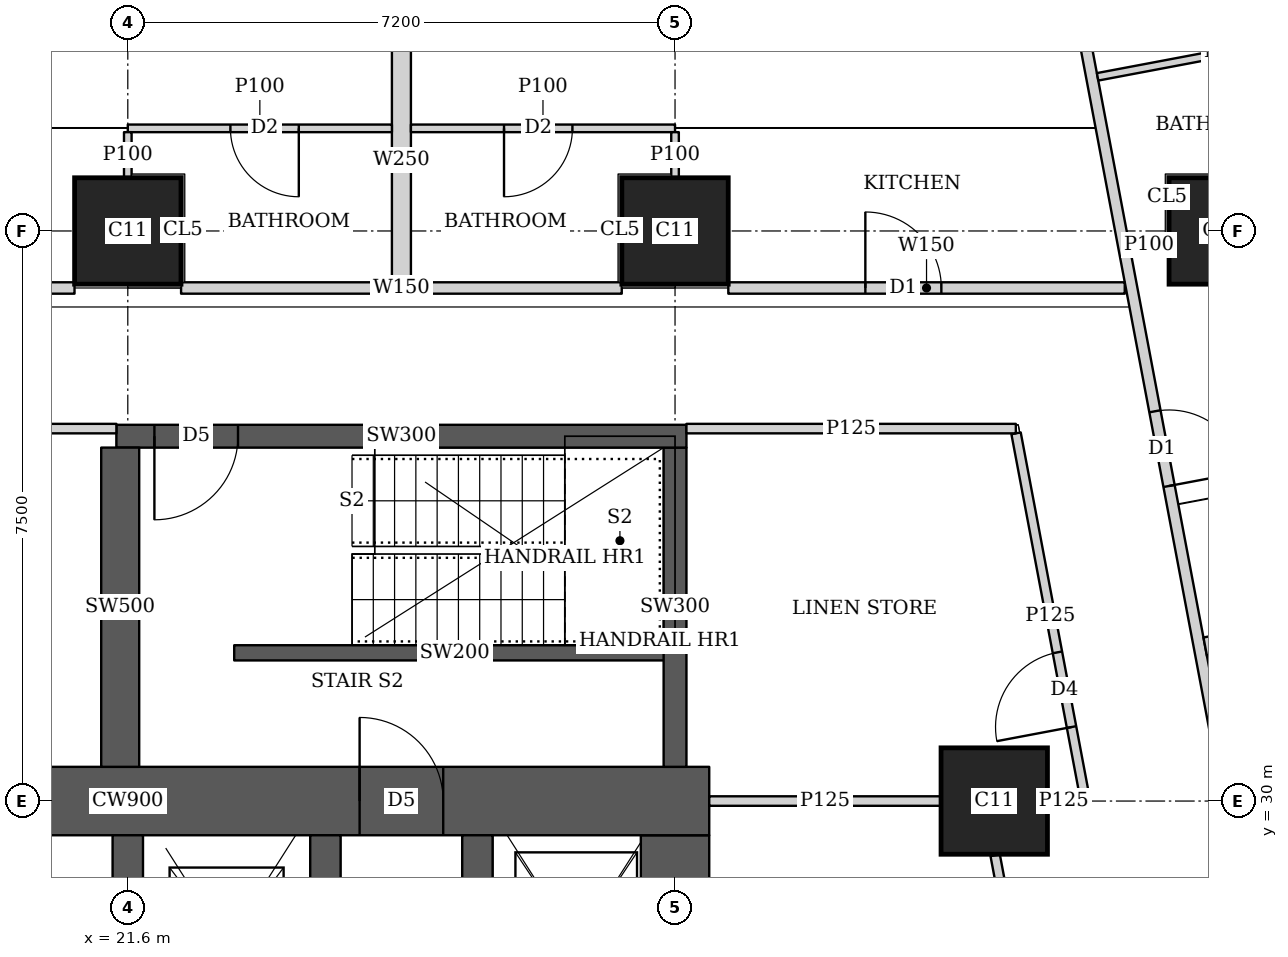
"""IFC4 building model, lengths in metres.
Left out: names, types, materials, properties, quantities, classifications, styles, units other than length and angle.
Written with IfcOpenShell. Run it as: python <this file> out.ifc"""

import sys

from ifc_helpers import new_model, si_unit, direction, frame, frame_2d, origin, origin_2d, place, context, subcontext, project, spatial, rectangle, extrude, element, fill, save


model = new_model("IFC4")
c1 = context("Model", 3, precision=1e-05, world=origin(), true_north=direction((0.0, 1.0)))
c2 = subcontext(c1, "Body", "Model", "MODEL_VIEW")
j1 = project(units=[si_unit("LENGTHUNIT", "METRE"), si_unit("PLANEANGLEUNIT", "RADIAN")], contexts=[c1])
p1 = place(None, origin())
s1 = spatial("IfcSite", under=j1, at=p1, CompositionType="ELEMENT")
p2 = place(p1, origin())
s2 = spatial("IfcBuilding", under=s1, at=p2, CompositionType="ELEMENT")
p3 = place(p2, frame((0.0, 0.0, 255.35)))
s3 = spatial("IfcBuildingStorey", under=s2, at=p3, CompositionType="ELEMENT", Elevation=255.35)
for number, where, z_axis, x_axis in (
    (1, (33.0, 30.0, 0.0), (0.0, 0.0, 1.0), (1.0, 0.0, 0.0)),
    (2, (21.6, 37.5, 0.0), (0.0, 0.0, 1.0), (1.0, 0.0, 0.0)),
    (3, (28.8, 37.5, 0.0), (0.0, 0.0, 1.0), (1.0, 0.0, 0.0)),
    (4, (36.0, 37.5, 0.0), (0.0, 0.0, 1.0), (1.0, 0.0, 0.0)),
):
    element("IfcColumn", number, at=place(p3, frame(where, z_axis=z_axis, x_axis=x_axis)), inside=s3, PredefinedType="COLUMN", context=c2, shape_type="SweptSolid", body=[
        extrude(rectangle(XDim=1.4, YDim=1.4, at=origin_2d()), origin(), (0.0, 0.0, 1.0), 3.75),
    ])
p4 = place(p3, frame((13.95, 30.0, 0.0), z_axis=(0.0, 0.0, 1.0), x_axis=(1.0, 0.0, 0.0)))
e5 = element("IfcWall", 5, at=p4, inside=s3, PredefinedType="SHEAR", context=c2, shape_type="SweptSolid", body=[
    extrude(rectangle(XDim=15.3, YDim=0.9, at=frame_2d((7.65, 0.0))), origin(), (0.0, 0.0, 1.0), 3.75),
])
p5 = place(p4, frame((4.45, 0.0, 0.0)))
e6 = element("IfcOpeningElement", 6, at=p5, cuts=e5, PredefinedType="OPENING", context=c2, shape_type="SweptSolid", body=[
    extrude(rectangle(XDim=1.8, YDim=2.1, at=frame_2d((0.9, 1.05))), frame((0.0, 0.46, 0.0), z_axis=(0.0, -1.0, 0.0), x_axis=(1.0, 0.0, 0.0)), (0.0, 0.0, 1.0), 0.92),
])
p6 = place(p4, frame((10.7, 0.0, 0.0)))
e7 = element("IfcOpeningElement", 7, at=p6, cuts=e5, PredefinedType="OPENING", context=c2, shape_type="SweptSolid", body=[
    extrude(rectangle(XDim=1.1, YDim=2.1, at=frame_2d((0.55, 1.05))), frame((0.0, 0.46, 0.0), z_axis=(0.0, -1.0, 0.0), x_axis=(1.0, 0.0, 0.0)), (0.0, 0.0, 1.0), 0.92),
])
p7 = place(p3, frame((28.8, 15.45, 0.0), z_axis=(0.0, 0.0, 1.0), x_axis=(0.0, 1.0, 0.0)))
e8 = element("IfcWall", 8, at=p7, inside=s3, PredefinedType="SHEAR", context=c2, shape_type="SweptSolid", body=[
    extrude(rectangle(XDim=14.1, YDim=0.9, at=frame_2d((7.05, 0.0))), origin(), (0.0, 0.0, 1.0), 3.75),
])
p8 = place(p3, frame((21.6, 15.45, 0.0), z_axis=(0.0, 0.0, 1.0), x_axis=(0.0, 1.0, 0.0)))
e9 = element("IfcWall", 9, at=p8, inside=s3, PredefinedType="SHEAR", context=c2, shape_type="SweptSolid", body=[
    extrude(rectangle(XDim=14.1, YDim=0.4, at=frame_2d((7.05, 0.0))), origin(), (0.0, 0.0, 1.0), 3.75),
])
p9 = place(p8, frame((0.875, 0.0, 0.0)))
e10 = element("IfcOpeningElement", 10, at=p9, cuts=e9, PredefinedType="OPENING", context=c2, shape_type="SweptSolid", body=[
    extrude(rectangle(XDim=1.1, YDim=2.1, at=frame_2d((0.55, 1.05))), frame((0.0, 0.21, 0.0), z_axis=(0.0, -1.0, 0.0), x_axis=(1.0, 0.0, 0.0)), (0.0, 0.0, 1.0), 0.42),
])
p10 = place(p8, frame((4.625, 0.0, 0.0)))
e11 = element("IfcOpeningElement", 11, at=p10, cuts=e9, PredefinedType="OPENING", context=c2, shape_type="SweptSolid", body=[
    extrude(rectangle(XDim=1.1, YDim=2.1, at=frame_2d((0.55, 1.05))), frame((0.0, 0.21, 0.0), z_axis=(0.0, -1.0, 0.0), x_axis=(1.0, 0.0, 0.0)), (0.0, 0.0, 1.0), 0.42),
])
p11 = place(p8, frame((8.375, 0.0, 0.0)))
e12 = element("IfcOpeningElement", 12, at=p11, cuts=e9, PredefinedType="OPENING", context=c2, shape_type="SweptSolid", body=[
    extrude(rectangle(XDim=1.1, YDim=2.1, at=frame_2d((0.55, 1.05))), frame((0.0, 0.21, 0.0), z_axis=(0.0, -1.0, 0.0), x_axis=(1.0, 0.0, 0.0)), (0.0, 0.0, 1.0), 0.42),
])
p12 = place(p8, frame((12.125, 0.0, 0.0)))
e13 = element("IfcOpeningElement", 13, at=p12, cuts=e9, PredefinedType="OPENING", context=c2, shape_type="SweptSolid", body=[
    extrude(rectangle(XDim=1.1, YDim=2.1, at=frame_2d((0.55, 1.05))), frame((0.0, 0.21, 0.0), z_axis=(0.0, -1.0, 0.0), x_axis=(1.0, 0.0, 0.0)), (0.0, 0.0, 1.0), 0.42),
])
p13 = place(p3, frame((24.2, 15.45, 0.0), z_axis=(0.0, 0.0, 1.0), x_axis=(0.0, 1.0, 0.0)))
e14 = element("IfcWall", 14, at=p13, inside=s3, PredefinedType="SHEAR", context=c2, shape_type="SweptSolid", body=[
    extrude(rectangle(XDim=14.1, YDim=0.4, at=frame_2d((7.05, 0.0))), origin(), (0.0, 0.0, 1.0), 3.75),
])
p14 = place(p3, frame((26.2, 26.45, 0.0), z_axis=(0.0, 0.0, 1.0), x_axis=(0.0, 1.0, 0.0)))
e15 = element("IfcWall", 15, at=p14, inside=s3, PredefinedType="SHEAR", context=c2, shape_type="SweptSolid", body=[
    extrude(rectangle(XDim=3.1, YDim=0.4, at=frame_2d((1.55, 0.0))), origin(), (0.0, 0.0, 1.0), 3.75),
])
p15 = place(p14, frame((1.075, 0.0, 0.0)))
e16 = element("IfcOpeningElement", 16, at=p15, cuts=e15, PredefinedType="OPENING", context=c2, shape_type="SweptSolid", body=[
    extrude(rectangle(XDim=1.2, YDim=2.1, at=frame_2d((0.6, 1.05))), frame((0.0, 0.21, 0.0), z_axis=(0.0, -1.0, 0.0), x_axis=(1.0, 0.0, 0.0)), (0.0, 0.0, 1.0), 0.42),
])
p16 = place(p3, frame((21.45, 34.8, 0.0), z_axis=(0.0, 0.0, 1.0), x_axis=(1.0, 0.0, 0.0)))
e17 = element("IfcWall", 17, at=p16, inside=s3, PredefinedType="SHEAR", context=c2, shape_type="SweptSolid", body=[
    extrude(rectangle(XDim=7.5, YDim=0.3, at=frame_2d((3.75, 0.0))), origin(), (0.0, 0.0, 1.0), 3.75),
])
p17 = place(p16, frame((0.5, 0.0, 0.0)))
e18 = element("IfcOpeningElement", 18, at=p17, cuts=e17, PredefinedType="OPENING", context=c2, shape_type="SweptSolid", body=[
    extrude(rectangle(XDim=1.1, YDim=2.1, at=frame_2d((0.55, 1.05))), frame((0.0, 0.16, 0.0), z_axis=(0.0, -1.0, 0.0), x_axis=(1.0, 0.0, 0.0)), (0.0, 0.0, 1.0), 0.32),
])
p18 = place(p3, frame((21.5, 30.45, 0.0), z_axis=(0.0, 0.0, 1.0), x_axis=(0.0, 1.0, 0.0)))
e19 = element("IfcWall", 19, at=p18, inside=s3, PredefinedType="SHEAR", context=c2, shape_type="SweptSolid", body=[
    extrude(rectangle(XDim=4.2, YDim=0.5, at=frame_2d((2.1, 0.0))), origin(), (0.0, 0.0, 1.0), 3.75),
])
p19 = place(p3, frame((28.8, 30.45, 0.0), z_axis=(0.0, 0.0, 1.0), x_axis=(0.0, 1.0, 0.0)))
e20 = element("IfcWall", 20, at=p19, inside=s3, PredefinedType="SHEAR", context=c2, shape_type="SweptSolid", body=[
    extrude(rectangle(XDim=4.2, YDim=0.3, at=frame_2d((2.1, 0.0))), origin(), (0.0, 0.0, 1.0), 3.75),
])
p20 = place(p3, frame((16.001, 36.75, 0.0), z_axis=(0.0, 0.0, 1.0), x_axis=(1.0, 0.0, 0.0)))
e21 = element("IfcWall", 21, at=p20, inside=s3, PredefinedType="SOLIDWALL", context=c2, shape_type="SweptSolid", body=[
    extrude(rectangle(XDim=4.898, YDim=0.15, at=frame_2d((2.449, 0.0))), origin(), (0.0, 0.0, 1.0), 3.5),
])
p21 = place(p20, frame((1.074, 0.0, 0.0)))
e22 = element("IfcOpeningElement", 22, at=p21, cuts=e21, PredefinedType="OPENING", context=c2, shape_type="SweptSolid", body=[
    extrude(rectangle(XDim=1.0, YDim=2.1, at=frame_2d((0.5, 1.05))), frame((0.0, 0.085, 0.0), z_axis=(0.0, -1.0, 0.0), x_axis=(1.0, 0.0, 0.0)), (0.0, 0.0, 1.0), 0.17),
])
p22 = place(p3, frame((22.301, 36.75, 0.0), z_axis=(0.0, 0.0, 1.0), x_axis=(1.0, 0.0, 0.0)))
e23 = element("IfcWall", 23, at=p22, inside=s3, PredefinedType="SOLIDWALL", context=c2, shape_type="SweptSolid", body=[
    extrude(rectangle(XDim=5.798, YDim=0.15, at=frame_2d((2.899, 0.0))), origin(), (0.0, 0.0, 1.0), 3.5),
])
p23 = place(p3, frame((29.501, 36.75, 0.0), z_axis=(0.0, 0.0, 1.0), x_axis=(1.0, 0.0, 0.0)))
e24 = element("IfcWall", 24, at=p23, inside=s3, PredefinedType="SOLIDWALL", context=c2, shape_type="SweptSolid", body=[
    extrude(rectangle(XDim=5.216, YDim=0.15, at=frame_2d((2.608, 0.0))), origin(), (0.0, 0.0, 1.0), 3.5),
])
p24 = place(p23, frame((1.803, 0.0, 0.0)))
e25 = element("IfcOpeningElement", 25, at=p24, cuts=e24, PredefinedType="OPENING", context=c2, shape_type="SweptSolid", body=[
    extrude(rectangle(XDim=1.0, YDim=2.1, at=frame_2d((0.5, 1.05))), frame((0.0, 0.085, 0.0), z_axis=(0.0, -1.0, 0.0), x_axis=(1.0, 0.0, 0.0)), (0.0, 0.0, 1.0), 0.17),
])
p25 = place(p3, frame((33.781, 42.186, 0.0), z_axis=(0.0, 0.0, 1.0), x_axis=(0.185593518645, -0.9826266055, 0.0)))
e26 = element("IfcWall", 26, at=p25, inside=s3, PredefinedType="SOLIDWALL", context=c2, shape_type="SweptSolid", body=[
    extrude(rectangle(XDim=35.961, YDim=0.15, at=frame_2d((17.98, 0.0))), origin(), (0.0, 0.0, 1.0), 2.5),
])
p26 = place(p25, frame((7.183, 0.0, 0.0)))
e27 = element("IfcOpeningElement", 27, at=p26, cuts=e26, PredefinedType="OPENING", context=c2, shape_type="SweptSolid", body=[
    extrude(rectangle(XDim=1.0, YDim=2.1, at=frame_2d((0.5, 1.05))), frame((0.0, 0.085, 0.0), z_axis=(0.0, -1.0, 0.0), x_axis=(1.0, 0.0, 0.0)), (0.0, 0.0, 1.0), 0.17),
])
p27 = place(p25, frame((11.76, 0.0, 0.0)))
e28 = element("IfcOpeningElement", 28, at=p27, cuts=e26, PredefinedType="OPENING", context=c2, shape_type="SweptSolid", body=[
    extrude(rectangle(XDim=1.0, YDim=2.1, at=frame_2d((0.5, 1.05))), frame((0.0, 0.085, 0.0), z_axis=(0.0, -1.0, 0.0), x_axis=(1.0, 0.0, 0.0)), (0.0, 0.0, 1.0), 0.17),
])
p28 = place(p25, frame((23.863, 0.0, 0.0)))
e29 = element("IfcOpeningElement", 29, at=p28, cuts=e26, PredefinedType="OPENING", context=c2, shape_type="SweptSolid", body=[
    extrude(rectangle(XDim=1.0, YDim=2.1, at=frame_2d((0.5, 1.05))), frame((0.0, 0.085, 0.0), z_axis=(0.0, -1.0, 0.0), x_axis=(1.0, 0.0, 0.0)), (0.0, 0.0, 1.0), 0.17),
])
p29 = place(p25, frame((30.502, 0.0, 0.0)))
e30 = element("IfcOpeningElement", 30, at=p29, cuts=e26, PredefinedType="OPENING", context=c2, shape_type="SweptSolid", body=[
    extrude(rectangle(XDim=1.0, YDim=2.1, at=frame_2d((0.5, 1.05))), frame((0.0, 0.085, 0.0), z_axis=(0.0, -1.0, 0.0), x_axis=(1.0, 0.0, 0.0)), (0.0, 0.0, 1.0), 0.17),
])
p30 = place(p3, frame((37.823, 40.182, 0.0), z_axis=(0.0, 0.0, 1.0), x_axis=(-0.98263926043, -0.185526504472, 0.0)))
e31 = element("IfcWall", 31, at=p30, inside=s3, PredefinedType="PARTITIONING", context=c2, shape_type="SweptSolid", body=[
    extrude(rectangle(XDim=3.524, YDim=0.1, at=frame_2d((1.762, 0.0))), origin(), (0.0, 0.0, 1.0), 3.5),
])
p31 = place(p3, frame((35.29, 37.366, 0.0), z_axis=(0.0, 0.0, 1.0), x_axis=(-0.982715597703, -0.185121727606, 0.0)))
e32 = element("IfcWall", 32, at=p31, inside=s3, PredefinedType="PARTITIONING", context=c2, shape_type="SweptSolid", body=[
    extrude(rectangle(XDim=0.513, YDim=0.1, at=frame_2d((0.256, 0.0))), origin(), (0.0, 0.0, 1.0), 3.5),
])
p32 = place(p3, frame((40.468, 32.915, 0.0), z_axis=(0.0, 0.0, 1.0), x_axis=(-0.982635807605, -0.185544791394, 0.0)))
e33 = element("IfcWall", 33, at=p32, inside=s3, PredefinedType="SOLIDWALL", context=c2, shape_type="SweptSolid", body=[
    extrude(rectangle(XDim=4.775, YDim=0.25, at=frame_2d((2.388, 0.0))), origin(), (0.0, 0.0, 1.0), 3.5),
])
p33 = place(p3, frame((21.6, 38.85, 0.0), z_axis=(0.0, 0.0, 1.0), x_axis=(1.0, 0.0, 0.0)))
e34 = element("IfcWall", 34, at=p33, inside=s3, PredefinedType="PARTITIONING", context=c2, shape_type="SweptSolid", body=[
    extrude(rectangle(XDim=3.475, YDim=0.1, at=frame_2d((1.737, 0.0))), origin(), (0.0, 0.0, 1.0), 3.5),
])
p34 = place(p33, frame((1.35, 0.0, 0.0)))
e35 = element("IfcOpeningElement", 35, at=p34, cuts=e34, PredefinedType="OPENING", context=c2, shape_type="SweptSolid", body=[
    extrude(rectangle(XDim=0.9, YDim=2.1, at=frame_2d((0.45, 1.05))), frame((0.0, 0.06, 0.0), z_axis=(0.0, -1.0, 0.0), x_axis=(1.0, 0.0, 0.0)), (0.0, 0.0, 1.0), 0.12),
])
p35 = place(p3, frame((21.6, 38.201, 0.0), z_axis=(0.0, 0.0, 1.0), x_axis=(0.0, 1.0, 0.0)))
e36 = element("IfcWall", 36, at=p35, inside=s3, PredefinedType="PARTITIONING", context=c2, shape_type="SweptSolid", body=[
    extrude(rectangle(XDim=0.599, YDim=0.1, at=frame_2d((0.3, 0.0))), origin(), (0.0, 0.0, 1.0), 3.5),
])
p36 = place(p3, frame((25.325, 38.85, 0.0), z_axis=(0.0, 0.0, 1.0), x_axis=(1.0, 0.0, 0.0)))
e37 = element("IfcWall", 37, at=p36, inside=s3, PredefinedType="PARTITIONING", context=c2, shape_type="SweptSolid", body=[
    extrude(rectangle(XDim=3.475, YDim=0.1, at=frame_2d((1.738, 0.0))), origin(), (0.0, 0.0, 1.0), 3.5),
])
p37 = place(p36, frame((1.225, 0.0, 0.0)))
e38 = element("IfcOpeningElement", 38, at=p37, cuts=e37, PredefinedType="OPENING", context=c2, shape_type="SweptSolid", body=[
    extrude(rectangle(XDim=0.9, YDim=2.1, at=frame_2d((0.45, 1.05))), frame((0.0, 0.06, 0.0), z_axis=(0.0, -1.0, 0.0), x_axis=(1.0, 0.0, 0.0)), (0.0, 0.0, 1.0), 0.12),
])
p38 = place(p3, frame((28.8, 38.201, 0.0), z_axis=(0.0, 0.0, 1.0), x_axis=(0.0, 1.0, 0.0)))
e39 = element("IfcWall", 39, at=p38, inside=s3, PredefinedType="PARTITIONING", context=c2, shape_type="SweptSolid", body=[
    extrude(rectangle(XDim=0.599, YDim=0.1, at=frame_2d((0.3, 0.0))), origin(), (0.0, 0.0, 1.0), 3.5),
])
p39 = place(p3, frame((25.2, 36.825, 0.0), z_axis=(0.0, 0.0, 1.0), x_axis=(0.0, 1.0, 0.0)))
e40 = element("IfcWall", 40, at=p39, inside=s3, PredefinedType="SOLIDWALL", context=c2, shape_type="SweptSolid", body=[
    extrude(rectangle(XDim=3.225, YDim=0.25, at=frame_2d((1.613, 0.0))), origin(), (0.0, 0.0, 1.0), 3.5),
])
p40 = place(p3, frame((13.75, 34.9, 0.0), z_axis=(0.0, 0.0, 1.0), x_axis=(1.0, 0.0, 0.0)))
e41 = element("IfcWall", 41, at=p40, inside=s3, PredefinedType="PARTITIONING", context=c2, shape_type="SweptSolid", body=[
    extrude(rectangle(XDim=7.7, YDim=0.125, at=frame_2d((3.85, 0.0))), origin(), (0.0, 0.0, 1.0), 3.5),
])
p41 = place(p40, frame((4.15, 0.0, 0.0)))
e42 = element("IfcOpeningElement", 42, at=p41, cuts=e41, PredefinedType="OPENING", context=c2, shape_type="SweptSolid", body=[
    extrude(rectangle(XDim=1.8, YDim=2.1, at=frame_2d((0.9, 1.05))), frame((0.0, 0.073, 0.0), z_axis=(0.0, -1.0, 0.0), x_axis=(1.0, 0.0, 0.0)), (0.0, 0.0, 1.0), 0.145),
])
p42 = place(p3, frame((28.95, 34.9, 0.0), z_axis=(0.0, 0.0, 1.0), x_axis=(1.0, 0.0, 0.0)))
e43 = element("IfcWall", 43, at=p42, inside=s3, PredefinedType="PARTITIONING", context=c2, shape_type="SweptSolid", body=[
    extrude(rectangle(XDim=4.334, YDim=0.125, at=frame_2d((2.167, 0.0))), origin(), (0.0, 0.0, 1.0), 3.5),
])
p43 = place(p3, frame((34.193, 30.04, 0.0), z_axis=(0.0, 0.0, 1.0), x_axis=(-0.185556349615, 0.98263362507, 0.0)))
e44 = element("IfcWall", 44, at=p43, inside=s3, PredefinedType="PARTITIONING", context=c2, shape_type="SweptSolid", body=[
    extrude(rectangle(XDim=4.883, YDim=0.125, at=frame_2d((2.441, 0.0))), origin(), (0.0, 0.0, 1.0), 2.5),
])
p44 = place(p43, frame((0.95, 0.0, 0.0)))
e45 = element("IfcOpeningElement", 45, at=p44, cuts=e44, PredefinedType="OPENING", context=c2, shape_type="SweptSolid", body=[
    extrude(rectangle(XDim=1.0, YDim=2.1, at=frame_2d((0.5, 1.05))), frame((0.0, 0.073, 0.0), z_axis=(0.0, -1.0, 0.0), x_axis=(1.0, 0.0, 0.0)), (0.0, 0.0, 1.0), 0.145),
])
p45 = place(p3, frame((34.28, 22.574, 0.0), z_axis=(0.0, 0.0, 1.0), x_axis=(-0.185610991981, 0.982623305064, 0.0)))
e46 = element("IfcWall", 46, at=p45, inside=s3, PredefinedType="PARTITIONING", context=c2, shape_type="SweptSolid", body=[
    extrude(rectangle(XDim=6.832, YDim=0.125, at=frame_2d((3.416, 0.0))), origin(), (0.0, 0.0, 1.0), 2.5),
])
p46 = place(p45, frame((3.241, 0.0, 0.0)))
e47 = element("IfcOpeningElement", 47, at=p46, cuts=e46, PredefinedType="OPENING", context=c2, shape_type="SweptSolid", body=[
    extrude(rectangle(XDim=1.0, YDim=2.1, at=frame_2d((0.5, 1.05))), frame((0.0, 0.073, 0.0), z_axis=(0.0, -1.0, 0.0), x_axis=(1.0, 0.0, 0.0)), (0.0, 0.0, 1.0), 0.145),
])
p47 = place(p3, frame((29.25, 30.0, 0.0), z_axis=(0.0, 0.0, 1.0), x_axis=(1.0, 0.0, 0.0)))
e48 = element("IfcWall", 48, at=p47, inside=s3, PredefinedType="PARTITIONING", context=c2, shape_type="SweptSolid", body=[
    extrude(rectangle(XDim=3.049, YDim=0.125, at=frame_2d((1.524, 0.0))), origin(), (0.0, 0.0, 1.0), 3.5),
])
p48 = place(p3, frame((33.701, 30.0, 0.0), z_axis=(0.0, 0.0, 1.0), x_axis=(1.0, 0.0, 0.0)))
e49 = element("IfcWall", 49, at=p48, inside=s3, PredefinedType="PARTITIONING", context=c2, shape_type="SweptSolid", body=[
    extrude(rectangle(XDim=0.424, YDim=0.125, at=frame_2d((0.212, 0.0))), origin(), (0.0, 0.0, 1.0), 2.5),
])
p49 = place(p3, frame((23.0, 31.95, 0.0), z_axis=(0.0, 0.0, 1.0), x_axis=(1.0, 0.0, 0.0)))
e50 = element("IfcWall", 50, at=p49, inside=s3, PredefinedType="SHEAR", context=c2, shape_type="SweptSolid", body=[
    extrude(rectangle(XDim=5.8, YDim=0.2, at=frame_2d((2.9, 0.0))), origin(), (0.0, 0.0, 1.0), 3.75),
])
p50 = place(p26, origin())
e51 = element("IfcDoor", 51, at=p50, inside=s3, OperationType="SINGLE_SWING_RIGHT", PredefinedType="DOOR", context=c2, shape_type="SweptSolid", body=[
    extrude(rectangle(XDim=1.0, YDim=2.1, at=frame_2d((0.5, 1.05))), frame((0.0, 0.025, 0.0), z_axis=(0.0, -1.0, 0.0), x_axis=(1.0, 0.0, 0.0)), (0.0, 0.0, 1.0), 0.05),
])
fill(e27, e51)
p51 = place(p34, origin())
e52 = element("IfcDoor", 52, at=p51, inside=s3, OperationType="SINGLE_SWING_LEFT", PredefinedType="DOOR", context=c2, shape_type="SweptSolid", body=[
    extrude(rectangle(XDim=0.9, YDim=2.1, at=frame_2d((0.45, 1.05))), frame((0.0, 0.025, 0.0), z_axis=(0.0, -1.0, 0.0), x_axis=(1.0, 0.0, 0.0)), (0.0, 0.0, 1.0), 0.05),
])
fill(e35, e52)
p52 = place(p37, origin())
e53 = element("IfcDoor", 53, at=p52, inside=s3, OperationType="SINGLE_SWING_RIGHT", PredefinedType="DOOR", context=c2, shape_type="SweptSolid", body=[
    extrude(rectangle(XDim=0.9, YDim=2.1, at=frame_2d((0.45, 1.05))), frame((0.0, 0.025, 0.0), z_axis=(0.0, -1.0, 0.0), x_axis=(1.0, 0.0, 0.0)), (0.0, 0.0, 1.0), 0.05),
])
fill(e38, e53)
p53 = place(p24, origin())
e54 = element("IfcDoor", 54, at=p53, inside=s3, OperationType="SINGLE_SWING_LEFT", PredefinedType="DOOR", context=c2, shape_type="SweptSolid", body=[
    extrude(rectangle(XDim=1.0, YDim=2.1, at=frame_2d((0.5, 1.05))), frame((0.0, 0.025, 0.0), z_axis=(0.0, -1.0, 0.0), x_axis=(1.0, 0.0, 0.0)), (0.0, 0.0, 1.0), 0.05),
])
fill(e25, e54)
p54 = place(p44, origin())
e55 = element("IfcDoor", 55, at=p54, inside=s3, OperationType="SINGLE_SWING_LEFT", PredefinedType="DOOR", context=c2, shape_type="SweptSolid", body=[
    extrude(rectangle(XDim=1.0, YDim=2.1, at=frame_2d((0.5, 1.05))), frame((0.0, 0.025, 0.0), z_axis=(0.0, -1.0, 0.0), x_axis=(1.0, 0.0, 0.0)), (0.0, 0.0, 1.0), 0.05),
])
fill(e45, e55)
p55 = place(p6, origin())
e56 = element("IfcDoor", 56, at=p55, inside=s3, OperationType="SINGLE_SWING_LEFT", PredefinedType="DOOR", context=c2, shape_type="SweptSolid", body=[
    extrude(rectangle(XDim=1.1, YDim=2.1, at=frame_2d((0.55, 1.05))), frame((0.0, 0.025, 0.0), z_axis=(0.0, -1.0, 0.0), x_axis=(1.0, 0.0, 0.0)), (0.0, 0.0, 1.0), 0.05),
])
fill(e7, e56)
p56 = place(p17, origin())
e57 = element("IfcDoor", 57, at=p56, inside=s3, OperationType="SINGLE_SWING_RIGHT", PredefinedType="DOOR", context=c2, shape_type="SweptSolid", body=[
    extrude(rectangle(XDim=1.1, YDim=2.1, at=frame_2d((0.55, 1.05))), frame((0.0, 0.025, 0.0), z_axis=(0.0, -1.0, 0.0), x_axis=(1.0, 0.0, 0.0)), (0.0, 0.0, 1.0), 0.05),
])
fill(e18, e57)
save(model, sys.argv[1])
